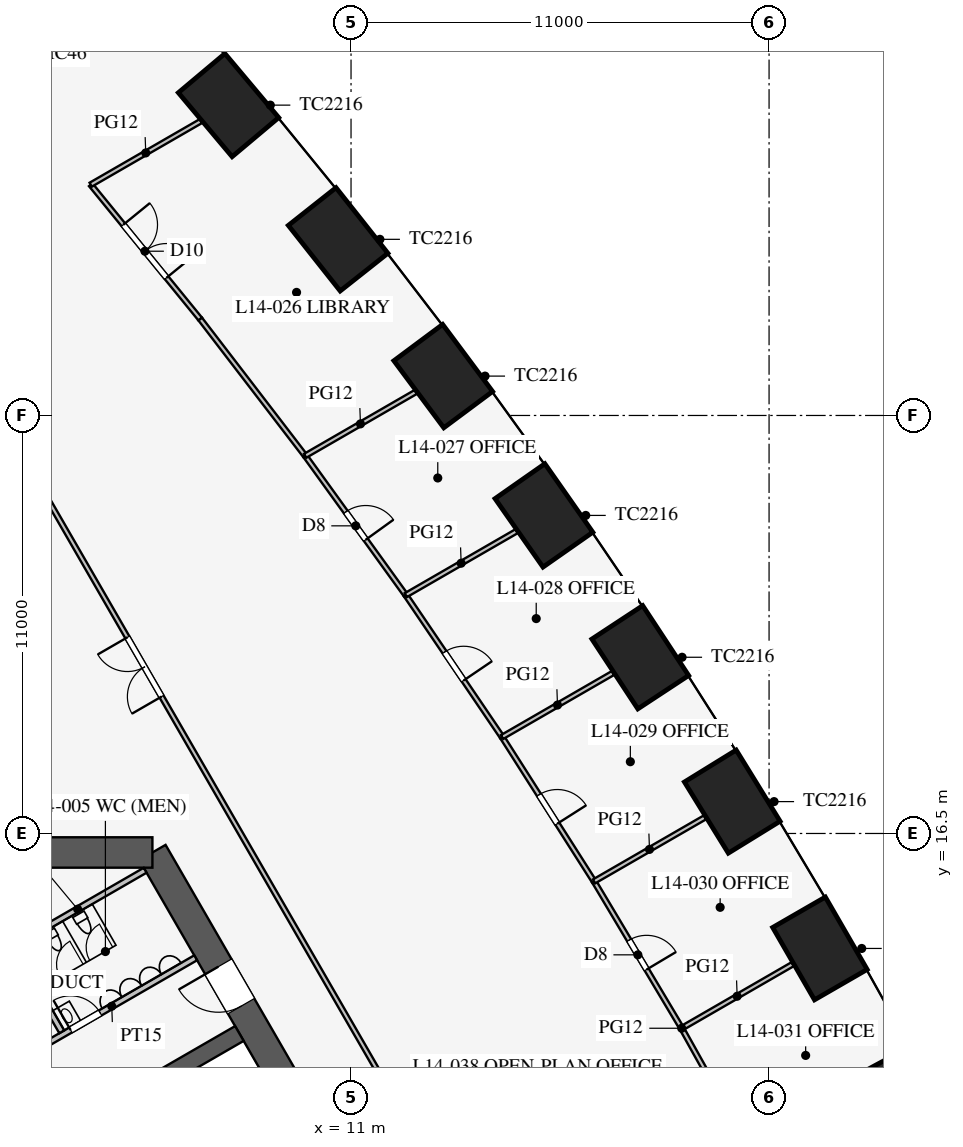
"""IFC4 building model, lengths in metres.
Left out: names, types, materials, properties, quantities, classifications, styles, units other than length and angle.
Written with IfcOpenShell. Run it as: python <this file> out.ifc"""

import sys

from ifc_helpers import new_model, si_unit, direction, frame, frame_2d, origin, origin_2d, place, context, subcontext, project, spatial, rectangle, extrude, element, fill, save


model = new_model("IFC4")
c1 = context("Model", 3, precision=1e-05, world=origin(), true_north=direction((0.0, 1.0)))
c2 = subcontext(c1, "Body", "Model", "MODEL_VIEW")
j1 = project(units=[si_unit("LENGTHUNIT", "METRE"), si_unit("PLANEANGLEUNIT", "RADIAN")], contexts=[c1])
p1 = place(None, origin())
s1 = spatial("IfcSite", under=j1, at=p1, CompositionType="ELEMENT")
p2 = place(p1, origin())
s2 = spatial("IfcBuilding", under=s1, at=p2, CompositionType="ELEMENT")
p3 = place(p2, frame((0.0, 0.0, 62.7)))
s3 = spatial("IfcBuildingStorey", under=s2, at=p3, CompositionType="ELEMENT", Elevation=62.7)
for number, where, z_axis, x_axis in (
    (1, (25.531, 9.544, 0.0), (0.0, 0.0, 1.0), (-0.475, 0.88, 0.0)),
    (2, (23.338, 13.474, 0.0), (0.0, 0.0, 1.0), (-0.5, 0.866, 0.0)),
    (3, (21.031, 17.339, 0.0), (0.0, 0.0, 1.0), (-0.525, 0.851, 0.0)),
    (4, (18.611, 21.137, 0.0), (0.0, 0.0, 1.0), (-0.549, 0.836, 0.0)),
    (5, (16.076, 24.87, 0.0), (0.0, 0.0, 1.0), (-0.574, 0.819, 0.0)),
    (6, (13.426, 28.536, 0.0), (0.0, 0.0, 1.0), (-0.597, 0.802, 0.0)),
    (7, (10.66, 32.135, 0.0), (0.0, 0.0, 1.0), (-0.62, 0.784, 0.0)),
    (8, (7.776, 35.667, 0.0), (0.0, 0.0, 1.0), (-0.643, 0.766, 0.0)),
):
    element("IfcColumn", number, at=place(p3, frame(where, z_axis=z_axis, x_axis=x_axis)), inside=s3, PredefinedType="COLUMN", context=c2, shape_type="SweptSolid", body=[
        extrude(rectangle(XDim=2.2, YDim=1.6, at=origin_2d()), origin(), (0.0, 0.0, 1.0), 4.2),
    ])
p4 = place(p3, frame((16.743, -3.0, 0.0), z_axis=(0.0, 0.0, 1.0), x_axis=(-0.500002442456, 0.866023993627, 0.0)))
e9 = element("IfcWall", 9, at=p4, inside=s3, PredefinedType="SHEAR", context=c2, shape_type="SweptSolid", body=[
    extrude(rectangle(XDim=21.939, YDim=0.8, at=frame_2d((10.97, 0.0))), origin(), (0.0, 0.0, 1.0), 4.2),
])
p5 = place(p4, frame((17.27, 0.0, 0.0)))
e10 = element("IfcOpeningElement", 10, at=p5, cuts=e9, PredefinedType="OPENING", context=c2, shape_type="SweptSolid", body=[
    extrude(rectangle(XDim=1.2, YDim=2.1, at=frame_2d((0.6, 1.05))), frame((0.0, 0.41, 0.0), z_axis=(0.0, -1.0, 0.0), x_axis=(1.0, 0.0, 0.0)), (0.0, 0.0, 1.0), 0.82),
])
p6 = place(p4, frame((3.47, 0.0, 0.0)))
e11 = element("IfcOpeningElement", 11, at=p6, cuts=e9, PredefinedType="OPENING", context=c2, shape_type="SweptSolid", body=[
    extrude(rectangle(XDim=1.2, YDim=2.1, at=frame_2d((0.6, 1.05))), frame((0.0, 0.41, 0.0), z_axis=(0.0, -1.0, 0.0), x_axis=(1.0, 0.0, 0.0)), (0.0, 0.0, 1.0), 0.82),
])
p7 = place(p3, frame((5.773, 16.0, 0.0), z_axis=(0.0, 0.0, 1.0), x_axis=(-1.0, 0.0, 0.0)))
e12 = element("IfcWall", 12, at=p7, inside=s3, PredefinedType="SHEAR", context=c2, shape_type="SweptSolid", body=[
    extrude(rectangle(XDim=11.547, YDim=0.8, at=frame_2d((5.773, 0.0))), origin(), (0.0, 0.0, 1.0), 4.2),
])
p8 = place(p3, frame((5.832, 9.949, 0.0), z_axis=(0.0, 0.0, 1.0), x_axis=(0.866029291668, 0.499993265928, 0.0)))
e13 = element("IfcWall", 13, at=p8, inside=s3, PredefinedType="SHEAR", context=c2, shape_type="SweptSolid", body=[
    extrude(rectangle(XDim=2.575, YDim=0.45, at=frame_2d((1.288, 0.0))), origin(), (0.0, 0.0, 1.0), 4.2),
])
p9 = place(p3, frame((2.495, 10.678, 0.0), z_axis=(0.0, 0.0, 1.0), x_axis=(0.86602216432, 0.500005610874, 0.0)))
e14 = element("IfcWall", 14, at=p9, inside=s3, PredefinedType="PARTITIONING", context=c2, shape_type="SweptSolid", body=[
    extrude(rectangle(XDim=5.1, YDim=0.15, at=frame_2d((2.55, 0.0))), origin(), (0.0, 0.0, 1.0), 4.0),
])
p10 = place(p9, frame((1.3, 0.0, 0.0)))
e15 = element("IfcOpeningElement", 15, at=p10, cuts=e14, PredefinedType="OPENING", context=c2, shape_type="SweptSolid", body=[
    extrude(rectangle(XDim=0.9, YDim=2.1, at=frame_2d((0.45, 1.05))), frame((0.0, 0.085, 0.0), z_axis=(0.0, -1.0, 0.0), x_axis=(1.0, 0.0, 0.0)), (0.0, 0.0, 1.0), 0.17),
])
p11 = place(p3, frame((2.031, 13.482, 0.0), z_axis=(0.0, 0.0, 1.0), x_axis=(0.866050731258, 0.499956128963, 0.0)))
e16 = element("IfcWall", 16, at=p11, inside=s3, PredefinedType="PARTITIONING", context=c2, shape_type="SweptSolid", body=[
    extrude(rectangle(XDim=4.1, YDim=0.15, at=frame_2d((2.05, 0.0))), origin(), (0.0, 0.0, 1.0), 4.0),
])
p12 = place(p3, frame((3.389, 11.281, 0.0), z_axis=(0.0, 0.0, 1.0), x_axis=(-0.499989096993, 0.866031698547, 0.0)))
e17 = element("IfcWall", 17, at=p12, inside=s3, PredefinedType="PARTITIONING", context=c2, shape_type="SweptSolid", body=[
    extrude(rectangle(XDim=2.51, YDim=0.15, at=frame_2d((1.255, 0.0))), origin(), (0.0, 0.0, 1.0), 4.0),
])
p13 = place(p3, frame((26.415, -15.231, 0.0), z_axis=(0.0, 0.0, 1.0), x_axis=(-0.50000091641, 0.866024874695, 0.0)))
e18 = element("IfcWall", 18, at=p13, inside=s3, PredefinedType="PARTITIONING", context=c2, shape_type="SweptSolid", body=[
    extrude(rectangle(XDim=52.796, YDim=0.12, at=frame_2d((26.398, 0.0))), origin(), (0.0, 0.0, 1.0), 2.9),
])
p14 = place(p13, frame((10.2, 0.0, 0.15)))
e19 = element("IfcOpeningElement", 19, at=p14, cuts=e18, PredefinedType="OPENING", context=c2, shape_type="SweptSolid", body=[
    extrude(rectangle(XDim=1.8, YDim=2.1, at=frame_2d((0.9, 1.05))), frame((0.0, 0.07, 0.0), z_axis=(0.0, -1.0, 0.0), x_axis=(1.0, 0.0, 0.0)), (0.0, 0.0, 1.0), 0.14),
])
p15 = place(p13, frame((40.8, 0.0, 0.15)))
e20 = element("IfcOpeningElement", 20, at=p15, cuts=e18, PredefinedType="OPENING", context=c2, shape_type="SweptSolid", body=[
    extrude(rectangle(XDim=1.8, YDim=2.1, at=frame_2d((0.9, 1.05))), frame((0.0, 0.07, 0.0), z_axis=(0.0, -1.0, 0.0), x_axis=(1.0, 0.0, 0.0)), (0.0, 0.0, 1.0), 0.14),
])
p16 = place(p3, frame((19.701, 11.374, 0.0), z_axis=(0.0, 0.0, 1.0), x_axis=(-0.512483962191, 0.858696796604, 0.0)))
e21 = element("IfcWall", 21, at=p16, inside=s3, PredefinedType="PARTITIONING", context=c2, shape_type="SweptSolid", body=[
    extrude(rectangle(XDim=4.5, YDim=0.12, at=frame_2d((2.25, 0.0))), origin(), (0.0, 0.0, 1.0), 2.9),
])
p17 = place(p16, frame((1.8, 0.0, 0.15)))
e22 = element("IfcOpeningElement", 22, at=p17, cuts=e21, PredefinedType="OPENING", context=c2, shape_type="SweptSolid", body=[
    extrude(rectangle(XDim=0.9, YDim=2.1, at=frame_2d((0.45, 1.05))), frame((0.0, 0.07, 0.0), z_axis=(0.0, -1.0, 0.0), x_axis=(1.0, 0.0, 0.0)), (0.0, 0.0, 1.0), 0.14),
])
p18 = place(p3, frame((12.441, 22.771, 0.0), z_axis=(0.0, 0.0, 1.0), x_axis=(-0.585376255171, 0.810761765183, 0.0)))
e23 = element("IfcWall", 23, at=p18, inside=s3, PredefinedType="PARTITIONING", context=c2, shape_type="SweptSolid", body=[
    extrude(rectangle(XDim=4.523, YDim=0.12, at=frame_2d((2.262, 0.0))), origin(), (0.0, 0.0, 1.0), 2.9),
])
p19 = place(p18, frame((1.8, 0.0, 0.15)))
e24 = element("IfcOpeningElement", 24, at=p19, cuts=e23, PredefinedType="OPENING", context=c2, shape_type="SweptSolid", body=[
    extrude(rectangle(XDim=0.9, YDim=2.1, at=frame_2d((0.45, 1.05))), frame((0.0, 0.07, 0.0), z_axis=(0.0, -1.0, 0.0), x_axis=(1.0, 0.0, 0.0)), (0.0, 0.0, 1.0), 0.14),
])
p20 = place(p3, frame((9.793, 26.439, 0.0), z_axis=(0.0, 0.0, 1.0), x_axis=(-0.608784932975, 0.79333530451, 0.0)))
e25 = element("IfcWall", 25, at=p20, inside=s3, PredefinedType="PARTITIONING", context=c2, shape_type="SweptSolid", body=[
    extrude(rectangle(XDim=4.539, YDim=0.12, at=frame_2d((2.27, 0.0))), origin(), (0.0, 0.0, 1.0), 2.9),
])
p21 = place(p3, frame((7.03, 30.04, 0.0), z_axis=(0.0, 0.0, 1.0), x_axis=(-0.631833879056, 0.775103831288, 0.0)))
e26 = element("IfcWall", 26, at=p21, inside=s3, PredefinedType="PARTITIONING", context=c2, shape_type="SweptSolid", body=[
    extrude(rectangle(XDim=4.558, YDim=0.12, at=frame_2d((2.279, 0.0))), origin(), (0.0, 0.0, 1.0), 2.9),
])
p22 = place(p21, frame((1.4, 0.0, 0.15)))
e27 = element("IfcOpeningElement", 27, at=p22, cuts=e26, PredefinedType="OPENING", context=c2, shape_type="SweptSolid", body=[
    extrude(rectangle(XDim=1.8, YDim=2.1, at=frame_2d((0.9, 1.05))), frame((0.0, 0.07, 0.0), z_axis=(0.0, -1.0, 0.0), x_axis=(1.0, 0.0, 0.0)), (0.0, 0.0, 1.0), 0.14),
])
p23 = place(p3, frame((17.395, 15.239, 0.0), z_axis=(0.0, 0.0, 1.0), x_axis=(-0.537243691336, 0.843427066272, 0.0)))
e28 = element("IfcWall", 28, at=p23, inside=s3, PredefinedType="PARTITIONING", context=c2, shape_type="SweptSolid", body=[
    extrude(rectangle(XDim=4.504, YDim=0.12, at=frame_2d((2.252, 0.0))), origin(), (0.0, 0.0, 1.0), 2.9),
])
p24 = place(p23, frame((1.8, 0.0, 0.15)))
e29 = element("IfcOpeningElement", 29, at=p24, cuts=e28, PredefinedType="OPENING", context=c2, shape_type="SweptSolid", body=[
    extrude(rectangle(XDim=0.9, YDim=2.1, at=frame_2d((0.45, 1.05))), frame((0.0, 0.07, 0.0), z_axis=(0.0, -1.0, 0.0), x_axis=(1.0, 0.0, 0.0)), (0.0, 0.0, 1.0), 0.14),
])
p25 = place(p3, frame((14.975, 19.038, 0.0), z_axis=(0.0, 0.0, 1.0), x_axis=(-0.561512004239, 0.827468591002, 0.0)))
e30 = element("IfcWall", 30, at=p25, inside=s3, PredefinedType="PARTITIONING", context=c2, shape_type="SweptSolid", body=[
    extrude(rectangle(XDim=4.512, YDim=0.12, at=frame_2d((2.256, 0.0))), origin(), (0.0, 0.0, 1.0), 2.9),
])
p26 = place(p25, frame((1.8, 0.0, 0.15)))
e31 = element("IfcOpeningElement", 31, at=p26, cuts=e30, PredefinedType="OPENING", context=c2, shape_type="SweptSolid", body=[
    extrude(rectangle(XDim=0.9, YDim=2.1, at=frame_2d((0.45, 1.05))), frame((0.0, 0.07, 0.0), z_axis=(0.0, -1.0, 0.0), x_axis=(1.0, 0.0, 0.0)), (0.0, 0.0, 1.0), 0.14),
])
p27 = place(p3, frame((21.895, 7.445, 0.0), z_axis=(0.0, 0.0, 1.0), x_axis=(-0.487415216275, 0.87317031955, 0.0)))
e32 = element("IfcWall", 32, at=p27, inside=s3, PredefinedType="PARTITIONING", context=c2, shape_type="SweptSolid", body=[
    extrude(rectangle(XDim=4.5, YDim=0.12, at=frame_2d((2.25, 0.0))), origin(), (0.0, 0.0, 1.0), 2.9),
])
p28 = place(p27, frame((1.8, 0.0, 0.15)))
e33 = element("IfcOpeningElement", 33, at=p28, cuts=e32, PredefinedType="OPENING", context=c2, shape_type="SweptSolid", body=[
    extrude(rectangle(XDim=0.9, YDim=2.1, at=frame_2d((0.45, 1.05))), frame((0.0, 0.07, 0.0), z_axis=(0.0, -1.0, 0.0), x_axis=(1.0, 0.0, 0.0)), (0.0, 0.0, 1.0), 0.14),
])
p29 = place(p3, frame((19.701, 11.374, 0.0), z_axis=(0.0, 0.0, 1.0), x_axis=(0.866014270972, 0.500019282102, 0.0)))
e34 = element("IfcWall", 34, at=p29, inside=s3, PredefinedType="PARTITIONING", context=c2, shape_type="SweptSolid", body=[
    extrude(rectangle(XDim=3.37, YDim=0.12, at=frame_2d((1.685, 0.0))), origin(), (0.0, 0.0, 1.0), 2.8),
])
p30 = place(p3, frame((12.441, 22.771, 0.0), z_axis=(0.0, 0.0, 1.0), x_axis=(0.865992196602, 0.500057512117, 0.0)))
e35 = element("IfcWall", 35, at=p30, inside=s3, PredefinedType="PARTITIONING", context=c2, shape_type="SweptSolid", body=[
    extrude(rectangle(XDim=3.364, YDim=0.12, at=frame_2d((1.682, 0.0))), origin(), (0.0, 0.0, 1.0), 2.6),
])
p31 = place(p3, frame((9.793, 26.439, 0.0), z_axis=(0.0, 0.0, 1.0), x_axis=(0.866029446706, 0.499992997389, 0.0)))
e36 = element("IfcWall", 36, at=p31, inside=s3, PredefinedType="PARTITIONING", context=c2, shape_type="SweptSolid", body=[
    extrude(rectangle(XDim=3.359, YDim=0.12, at=frame_2d((1.679, 0.0))), origin(), (0.0, 0.0, 1.0), 2.6),
])
p32 = place(p3, frame((4.15, 33.573, 0.0), z_axis=(0.0, 0.0, 1.0), x_axis=(0.866002045187, 0.500040456096, 0.0)))
e37 = element("IfcWall", 37, at=p32, inside=s3, PredefinedType="PARTITIONING", context=c2, shape_type="SweptSolid", body=[
    extrude(rectangle(XDim=3.345, YDim=0.12, at=frame_2d((1.672, 0.0))), origin(), (0.0, 0.0, 1.0), 2.9),
])
p33 = place(p3, frame((17.395, 15.239, 0.0), z_axis=(0.0, 0.0, 1.0), x_axis=(0.865991297194, 0.500059069696, 0.0)))
e38 = element("IfcWall", 38, at=p33, inside=s3, PredefinedType="PARTITIONING", context=c2, shape_type="SweptSolid", body=[
    extrude(rectangle(XDim=3.369, YDim=0.12, at=frame_2d((1.685, 0.0))), origin(), (0.0, 0.0, 1.0), 2.8),
])
p34 = place(p3, frame((14.975, 19.038, 0.0), z_axis=(0.0, 0.0, 1.0), x_axis=(0.866039498442, 0.499975586543, 0.0)))
e39 = element("IfcWall", 39, at=p34, inside=s3, PredefinedType="PARTITIONING", context=c2, shape_type="SweptSolid", body=[
    extrude(rectangle(XDim=3.367, YDim=0.12, at=frame_2d((1.684, 0.0))), origin(), (0.0, 0.0, 1.0), 2.8),
])
p35 = place(p10, origin())
e40 = element("IfcDoor", 40, at=p35, inside=s3, OperationType="SINGLE_SWING_LEFT", PredefinedType="DOOR", context=c2, shape_type="SweptSolid", body=[
    extrude(rectangle(XDim=0.9, YDim=2.1, at=frame_2d((0.45, 1.05))), frame((0.0, 0.025, 0.0), z_axis=(0.0, -1.0, 0.0), x_axis=(1.0, 0.0, 0.0)), (0.0, 0.0, 1.0), 0.05),
])
fill(e15, e40)
p36 = place(p5, origin())
e41 = element("IfcDoor", 41, at=p36, inside=s3, OperationType="SINGLE_SWING_RIGHT", PredefinedType="DOOR", context=c2, shape_type="SweptSolid", body=[
    extrude(rectangle(XDim=1.2, YDim=2.1, at=frame_2d((0.6, 1.05))), frame((0.0, 0.025, 0.0), z_axis=(0.0, -1.0, 0.0), x_axis=(1.0, 0.0, 0.0)), (0.0, 0.0, 1.0), 0.05),
])
fill(e10, e41)
p37 = place(p22, frame((1.8, 0.0, 0.0), z_axis=(0.0, 0.0, 1.0), x_axis=(-1.0, 0.0, 0.0)))
e42 = element("IfcDoor", 42, at=p37, inside=s3, OperationType="DOUBLE_DOOR_SINGLE_SWING", PredefinedType="DOOR", context=c2, shape_type="SweptSolid", body=[
    extrude(rectangle(XDim=1.8, YDim=2.1, at=frame_2d((0.9, 1.05))), frame((0.0, 0.025, 0.0), z_axis=(0.0, -1.0, 0.0), x_axis=(1.0, 0.0, 0.0)), (0.0, 0.0, 1.0), 0.05),
])
fill(e27, e42)
p38 = place(p19, frame((0.9, 0.0, 0.0), z_axis=(0.0, 0.0, 1.0), x_axis=(-1.0, 0.0, 0.0)))
e43 = element("IfcDoor", 43, at=p38, inside=s3, OperationType="SINGLE_SWING_RIGHT", PredefinedType="DOOR", context=c2, shape_type="SweptSolid", body=[
    extrude(rectangle(XDim=0.9, YDim=2.1, at=frame_2d((0.45, 1.05))), frame((0.0, 0.025, 0.0), z_axis=(0.0, -1.0, 0.0), x_axis=(1.0, 0.0, 0.0)), (0.0, 0.0, 1.0), 0.05),
])
fill(e24, e43)
p39 = place(p26, frame((0.9, 0.0, 0.0), z_axis=(0.0, 0.0, 1.0), x_axis=(-1.0, 0.0, 0.0)))
e44 = element("IfcDoor", 44, at=p39, inside=s3, OperationType="SINGLE_SWING_RIGHT", PredefinedType="DOOR", context=c2, shape_type="SweptSolid", body=[
    extrude(rectangle(XDim=0.9, YDim=2.1, at=frame_2d((0.45, 1.05))), frame((0.0, 0.025, 0.0), z_axis=(0.0, -1.0, 0.0), x_axis=(1.0, 0.0, 0.0)), (0.0, 0.0, 1.0), 0.05),
])
fill(e31, e44)
p40 = place(p24, frame((0.9, 0.0, 0.0), z_axis=(0.0, 0.0, 1.0), x_axis=(-1.0, 0.0, 0.0)))
e45 = element("IfcDoor", 45, at=p40, inside=s3, OperationType="SINGLE_SWING_RIGHT", PredefinedType="DOOR", context=c2, shape_type="SweptSolid", body=[
    extrude(rectangle(XDim=0.9, YDim=2.1, at=frame_2d((0.45, 1.05))), frame((0.0, 0.025, 0.0), z_axis=(0.0, -1.0, 0.0), x_axis=(1.0, 0.0, 0.0)), (0.0, 0.0, 1.0), 0.05),
])
fill(e29, e45)
p41 = place(p17, frame((0.9, 0.0, 0.0), z_axis=(0.0, 0.0, 1.0), x_axis=(-1.0, 0.0, 0.0)))
e46 = element("IfcDoor", 46, at=p41, inside=s3, OperationType="SINGLE_SWING_RIGHT", PredefinedType="DOOR", context=c2, shape_type="SweptSolid", body=[
    extrude(rectangle(XDim=0.9, YDim=2.1, at=frame_2d((0.45, 1.05))), frame((0.0, 0.025, 0.0), z_axis=(0.0, -1.0, 0.0), x_axis=(1.0, 0.0, 0.0)), (0.0, 0.0, 1.0), 0.05),
])
fill(e22, e46)
p42 = place(p15, origin())
e47 = element("IfcDoor", 47, at=p42, inside=s3, OperationType="DOUBLE_DOOR_SINGLE_SWING", PredefinedType="DOOR", context=c2, shape_type="SweptSolid", body=[
    extrude(rectangle(XDim=1.8, YDim=2.1, at=frame_2d((0.9, 1.05))), frame((0.0, 0.025, 0.0), z_axis=(0.0, -1.0, 0.0), x_axis=(1.0, 0.0, 0.0)), (0.0, 0.0, 1.0), 0.05),
])
fill(e20, e47)
save(model, sys.argv[1])
